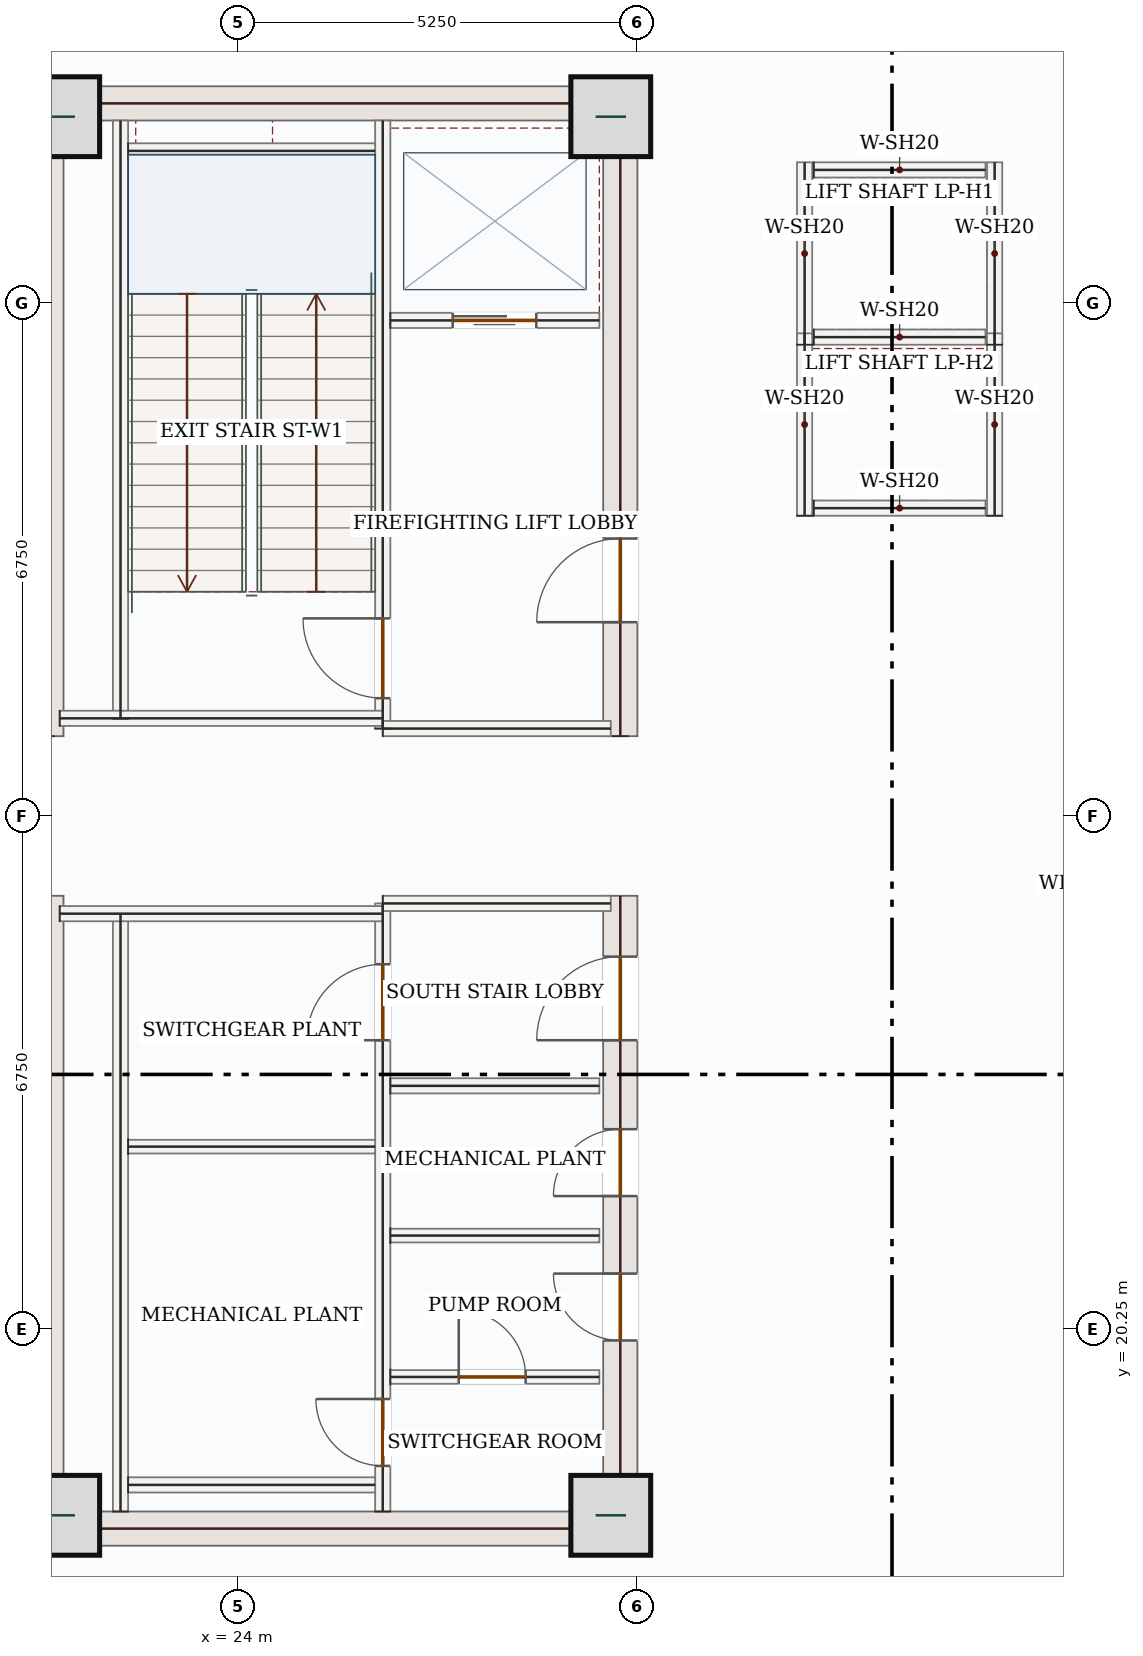
"""IFC4 building model, lengths in metres.
Left out: names, types, materials, properties, quantities, classifications, styles, units other than length and angle.
Written with IfcOpenShell. Run it as: python <this file> out.ifc"""

import sys

from ifc_helpers import new_model, si_unit, direction, frame, frame_2d, origin, origin_2d, place, context, subcontext, project, spatial, rectangle, extrude, source, transform, mapped, element, fill, save


model = new_model("IFC4")
c1 = context("Model", 3, precision=1e-05, world=origin(), true_north=direction((0.0, 1.0)))
c2 = subcontext(c1, "Body", "Model", "MODEL_VIEW")
j1 = project(units=[si_unit("LENGTHUNIT", "METRE"), si_unit("PLANEANGLEUNIT", "RADIAN")], contexts=[c1])
p1 = place(None, origin())
s1 = spatial("IfcSite", under=j1, at=p1, CompositionType="ELEMENT")
p2 = place(p1, origin())
s2 = spatial("IfcBuilding", under=s1, at=p2, CompositionType="ELEMENT")
p3 = place(p2, frame((0.0, 0.0, 314.1)))
s3 = spatial("IfcBuildingStorey", under=s2, at=p3, CompositionType="ELEMENT", Elevation=314.1)
m1 = source(origin(), c2, "Body", "SweptSolid", [
    extrude(rectangle(XDim=8.55, YDim=0.45, at=frame_2d((4.275, 0.0))), origin(), (0.0, 0.0, 1.0), 5.45),
])
for number, where, z_axis, x_axis in (
    (1, (21.475, 17.4, 0.0), (0.0, 0.0, 1.0), (0.0, 1.0, 0.0)),
    (2, (21.475, 28.05, 0.0), (0.0, 0.0, 1.0), (0.0, 1.0, 0.0)),
):
    element("IfcWall", number, at=place(p3, frame(where, z_axis=z_axis, x_axis=x_axis)), inside=s3, PredefinedType="SHEAR", context=c2, shape_type="MappedRepresentation", body=[
        mapped(m1, transform((0.0, 0.0, 0.0), x_axis=(1.0, 0.0, 0.0), y_axis=(0.0, 1.0, 0.0), z_axis=(0.0, 0.0, 1.0), scale=1.0)),
    ])
p4 = place(p3, frame((29.025, 17.4, 0.0), z_axis=(0.0, 0.0, 1.0), x_axis=(0.0, 1.0, 0.0)))
e3 = element("IfcWall", 3, at=p4, inside=s3, PredefinedType="SHEAR", context=c2, shape_type="SweptSolid", body=[
    extrude(rectangle(XDim=8.55, YDim=0.45, at=frame_2d((4.275, 0.0))), origin(), (0.0, 0.0, 1.0), 5.45),
])
p5 = place(p4, frame((6.65, 0.0, 0.0)))
e4 = element("IfcOpeningElement", 4, at=p5, cuts=e3, PredefinedType="OPENING", context=c2, shape_type="SweptSolid", body=[
    extrude(rectangle(XDim=1.1, YDim=2.2, at=frame_2d((0.55, 1.1))), frame((0.0, 0.235, 0.0), z_axis=(0.0, -1.0, 0.0), x_axis=(1.0, 0.0, 0.0)), (0.0, 0.0, 1.0), 0.47),
])
p6 = place(p4, frame((2.7, 0.0, 0.0)))
e5 = element("IfcOpeningElement", 5, at=p6, cuts=e3, PredefinedType="OPENING", context=c2, shape_type="SweptSolid", body=[
    extrude(rectangle(XDim=0.88, YDim=2.1, at=frame_2d((0.44, 1.05))), frame((0.0, 0.235, 0.0), z_axis=(0.0, -1.0, 0.0), x_axis=(1.0, 0.0, 0.0)), (0.0, 0.0, 1.0), 0.47),
])
p7 = place(p4, frame((4.6, 0.0, 0.0)))
e6 = element("IfcOpeningElement", 6, at=p7, cuts=e3, PredefinedType="OPENING", context=c2, shape_type="SweptSolid", body=[
    extrude(rectangle(XDim=0.88, YDim=2.1, at=frame_2d((0.44, 1.05))), frame((0.0, 0.235, 0.0), z_axis=(0.0, -1.0, 0.0), x_axis=(1.0, 0.0, 0.0)), (0.0, 0.0, 1.0), 0.47),
])
p8 = place(p3, frame((29.025, 28.05, 0.0), z_axis=(0.0, 0.0, 1.0), x_axis=(0.0, 1.0, 0.0)))
e7 = element("IfcWall", 7, at=p8, inside=s3, PredefinedType="SHEAR", context=c2, shape_type="SweptSolid", body=[
    extrude(rectangle(XDim=8.55, YDim=0.45, at=frame_2d((4.275, 0.0))), origin(), (0.0, 0.0, 1.0), 5.45),
])
p9 = place(p8, frame((1.5, 0.0, 0.0)))
e8 = element("IfcOpeningElement", 8, at=p9, cuts=e7, PredefinedType="OPENING", context=c2, shape_type="SweptSolid", body=[
    extrude(rectangle(XDim=1.1, YDim=2.2, at=frame_2d((0.55, 1.1))), frame((0.0, 0.235, 0.0), z_axis=(0.0, -1.0, 0.0), x_axis=(1.0, 0.0, 0.0)), (0.0, 0.0, 1.0), 0.47),
])
m2 = source(origin(), c2, "Body", "SweptSolid", [
    extrude(rectangle(XDim=7.1, YDim=0.45, at=frame_2d((3.55, 0.0))), origin(), (0.0, 0.0, 1.0), 5.45),
])
for number, where, z_axis, x_axis in (
    (9, (21.7, 17.625, 0.0), (0.0, 0.0, 1.0), (1.0, 0.0, 0.0)),
    (10, (21.7, 36.375, 0.0), (0.0, 0.0, 1.0), (1.0, 0.0, 0.0)),
):
    element("IfcWall", number, at=place(p3, frame(where, z_axis=z_axis, x_axis=x_axis)), inside=s3, PredefinedType="SHEAR", context=c2, shape_type="MappedRepresentation", body=[
        mapped(m2, transform((0.0, 0.0, 0.0), x_axis=(1.0, 0.0, 0.0), y_axis=(0.0, 1.0, 0.0), z_axis=(0.0, 0.0, 1.0), scale=1.0)),
    ])
m3 = source(origin(), c2, "Body", "SweptSolid", [
    extrude(rectangle(XDim=1.05, YDim=1.05, at=origin_2d()), origin(), (0.0, 0.0, 1.0), 5.7),
])
for number, where, z_axis, x_axis in (
    (11, (21.65, 17.8, 0.0), (0.0, 0.0, 1.0), (1.0, 0.0, 0.0)),
    (12, (28.9, 17.8, 0.0), (0.0, 0.0, 1.0), (1.0, 0.0, 0.0)),
    (13, (21.65, 36.2, 0.0), (0.0, 0.0, 1.0), (1.0, 0.0, 0.0)),
    (14, (28.9, 36.2, 0.0), (0.0, 0.0, 1.0), (1.0, 0.0, 0.0)),
):
    element("IfcColumn", number, at=place(p3, frame(where, z_axis=z_axis, x_axis=x_axis)), inside=s3, PredefinedType="COLUMN", context=c2, shape_type="MappedRepresentation", body=[
        mapped(m3, transform((0.0, 0.0, 0.0), x_axis=(1.0, 0.0, 0.0), y_axis=(0.0, 1.0, 0.0), z_axis=(0.0, 0.0, 1.0), scale=1.0)),
    ])
m4 = source(origin(), c2, "Body", "SweptSolid", [
    extrude(rectangle(XDim=7.87, YDim=0.2, at=frame_2d((3.935, 0.0))), origin(), (0.0, 0.0, 1.0), 5.45),
])
for number, where, z_axis, x_axis in (
    (15, (22.45, 17.85, 0.0), (0.0, 0.0, 1.0), (0.0, 1.0, 0.0)),
    (16, (22.45, 28.28, 0.0), (0.0, 0.0, 1.0), (0.0, 1.0, 0.0)),
):
    element("IfcWall", number, at=place(p3, frame(where, z_axis=z_axis, x_axis=x_axis)), inside=s3, PredefinedType="SOLIDWALL", context=c2, shape_type="MappedRepresentation", body=[
        mapped(m4, transform((0.0, 0.0, 0.0), x_axis=(1.0, 0.0, 0.0), y_axis=(0.0, 1.0, 0.0), z_axis=(0.0, 0.0, 1.0), scale=1.0)),
    ])
p10 = place(p3, frame((25.9, 17.85, 0.0), z_axis=(0.0, 0.0, 1.0), x_axis=(0.0, 1.0, 0.0)))
e17 = element("IfcWall", 17, at=p10, inside=s3, PredefinedType="SOLIDWALL", context=c2, shape_type="SweptSolid", body=[
    extrude(rectangle(XDim=8.0, YDim=0.2, at=frame_2d((4.0, 0.0))), origin(), (0.0, 0.0, 1.0), 5.45),
])
p11 = place(p10, frame((6.2, 0.0, 0.0)))
e18 = element("IfcOpeningElement", 18, at=p11, cuts=e17, PredefinedType="OPENING", context=c2, shape_type="SweptSolid", body=[
    extrude(rectangle(XDim=1.0, YDim=2.15, at=frame_2d((0.5, 1.075))), frame((0.0, 0.11, 0.0), z_axis=(0.0, -1.0, 0.0), x_axis=(1.0, 0.0, 0.0)), (0.0, 0.0, 1.0), 0.22),
])
p12 = place(p10, frame((0.6, 0.0, 0.0)))
e19 = element("IfcOpeningElement", 19, at=p12, cuts=e17, PredefinedType="OPENING", context=c2, shape_type="SweptSolid", body=[
    extrude(rectangle(XDim=0.88, YDim=2.1, at=frame_2d((0.44, 1.05))), frame((0.0, 0.11, 0.0), z_axis=(0.0, -1.0, 0.0), x_axis=(1.0, 0.0, 0.0)), (0.0, 0.0, 1.0), 0.22),
])
p13 = place(p3, frame((25.9, 28.15, 0.0), z_axis=(0.0, 0.0, 1.0), x_axis=(0.0, 1.0, 0.0)))
e20 = element("IfcWall", 20, at=p13, inside=s3, PredefinedType="SOLIDWALL", context=c2, shape_type="SweptSolid", body=[
    extrude(rectangle(XDim=8.0, YDim=0.2, at=frame_2d((4.0, 0.0))), origin(), (0.0, 0.0, 1.0), 5.45),
])
p14 = place(p13, frame((0.4, 0.0, 0.0)))
e21 = element("IfcOpeningElement", 21, at=p14, cuts=e20, PredefinedType="OPENING", context=c2, shape_type="SweptSolid", body=[
    extrude(rectangle(XDim=1.05, YDim=2.15, at=frame_2d((0.525, 1.075))), frame((0.0, 0.11, 0.0), z_axis=(0.0, -1.0, 0.0), x_axis=(1.0, 0.0, 0.0)), (0.0, 0.0, 1.0), 0.22),
])
m5 = source(origin(), c2, "Body", "SweptSolid", [
    extrude(rectangle(XDim=4.25, YDim=0.2, at=frame_2d((2.125, 0.0))), origin(), (0.0, 0.0, 1.0), 5.45),
])
p15 = place(p3, frame((21.65, 25.715, 0.0), z_axis=(0.0, 0.0, 1.0), x_axis=(1.0, 0.0, 0.0)))
e22 = element("IfcWall", 22, at=p15, inside=s3, PredefinedType="SOLIDWALL", context=c2, shape_type="MappedRepresentation", body=[
    mapped(m5, transform((0.0, 0.0, 0.0), x_axis=(1.0, 0.0, 0.0), y_axis=(0.0, 1.0, 0.0), z_axis=(0.0, 0.0, 1.0), scale=1.0)),
])
m6 = source(origin(), c2, "Body", "SweptSolid", [
    extrude(rectangle(XDim=3.0, YDim=0.2, at=frame_2d((1.5, 0.0))), origin(), (0.0, 0.0, 1.0), 5.45),
])
p16 = place(p3, frame((25.9, 25.85, 0.0), z_axis=(0.0, 0.0, 1.0), x_axis=(1.0, 0.0, 0.0)))
e23 = element("IfcWall", 23, at=p16, inside=s3, PredefinedType="SOLIDWALL", context=c2, shape_type="MappedRepresentation", body=[
    mapped(m6, transform((0.0, 0.0, 0.0), x_axis=(1.0, 0.0, 0.0), y_axis=(0.0, 1.0, 0.0), z_axis=(0.0, 0.0, 1.0), scale=1.0)),
])
p17 = place(p3, frame((21.65, 28.285, 0.0), z_axis=(0.0, 0.0, 1.0), x_axis=(1.0, 0.0, 0.0)))
e24 = element("IfcWall", 24, at=p17, inside=s3, PredefinedType="SOLIDWALL", context=c2, shape_type="MappedRepresentation", body=[
    mapped(m5, transform((0.0, 0.0, 0.0), x_axis=(1.0, 0.0, 0.0), y_axis=(0.0, 1.0, 0.0), z_axis=(0.0, 0.0, 1.0), scale=1.0)),
])
p18 = place(p3, frame((25.9, 28.15, 0.0), z_axis=(0.0, 0.0, 1.0), x_axis=(1.0, 0.0, 0.0)))
e25 = element("IfcWall", 25, at=p18, inside=s3, PredefinedType="SOLIDWALL", context=c2, shape_type="MappedRepresentation", body=[
    mapped(m6, transform((0.0, 0.0, 0.0), x_axis=(1.0, 0.0, 0.0), y_axis=(0.0, 1.0, 0.0), z_axis=(0.0, 0.0, 1.0), scale=1.0)),
])
m7 = source(origin(), c2, "Body", "SweptSolid", [
    extrude(rectangle(XDim=3.25, YDim=0.2, at=frame_2d((1.625, 0.0))), origin(), (0.0, 0.0, 1.0), 5.45),
])
for number, where, z_axis, x_axis in (
    (26, (22.55, 35.75, 0.0), (0.0, 0.0, 1.0), (1.0, 0.0, 0.0)),
    (27, (22.55, 18.2, 0.0), (0.0, 0.0, 1.0), (1.0, 0.0, 0.0)),
):
    element("IfcWall", number, at=place(p3, frame(where, z_axis=z_axis, x_axis=x_axis)), inside=s3, PredefinedType="SOLIDWALL", context=c2, shape_type="MappedRepresentation", body=[
        mapped(m7, transform((0.0, 0.0, 0.0), x_axis=(1.0, 0.0, 0.0), y_axis=(0.0, 1.0, 0.0), z_axis=(0.0, 0.0, 1.0), scale=1.0)),
    ])
m8 = source(origin(), c2, "Body", "SweptSolid", [
    extrude(rectangle(XDim=3.25, YDim=0.18, at=frame_2d((1.625, 0.0))), origin(), (0.0, 0.0, 1.0), 5.45),
])
p19 = place(p3, frame((22.55, 22.65, 0.0), z_axis=(0.0, 0.0, 1.0), x_axis=(1.0, 0.0, 0.0)))
e28 = element("IfcWall", 28, at=p19, inside=s3, PredefinedType="PARTITIONING", context=c2, shape_type="MappedRepresentation", body=[
    mapped(m8, transform((0.0, 0.0, 0.0), x_axis=(1.0, 0.0, 0.0), y_axis=(0.0, 1.0, 0.0), z_axis=(0.0, 0.0, 1.0), scale=1.0)),
])
p20 = place(p3, frame((26.0, 33.52, 0.0), z_axis=(0.0, 0.0, 1.0), x_axis=(1.0, 0.0, 0.0)))
e29 = element("IfcWall", 29, at=p20, inside=s3, PredefinedType="SOLIDWALL", context=c2, shape_type="SweptSolid", body=[
    extrude(rectangle(XDim=2.75, YDim=0.2, at=frame_2d((1.375, 0.0))), origin(), (0.0, 0.0, 1.0), 5.45),
])
p21 = place(p20, frame((0.82, 0.0, 0.0)))
e30 = element("IfcOpeningElement", 30, at=p21, cuts=e29, PredefinedType="OPENING", context=c2, shape_type="SweptSolid", body=[
    extrude(rectangle(XDim=1.1, YDim=2.15, at=frame_2d((0.55, 1.075))), frame((0.0, 0.11, 0.0), z_axis=(0.0, -1.0, 0.0), x_axis=(1.0, 0.0, 0.0)), (0.0, 0.0, 1.0), 0.22),
])
m9 = source(origin(), c2, "Body", "SweptSolid", [
    extrude(rectangle(XDim=2.75, YDim=0.2, at=frame_2d((1.375, 0.0))), origin(), (0.0, 0.0, 1.0), 5.45),
])
p22 = place(p3, frame((26.0, 23.45, 0.0), z_axis=(0.0, 0.0, 1.0), x_axis=(1.0, 0.0, 0.0)))
e31 = element("IfcWall", 31, at=p22, inside=s3, PredefinedType="SOLIDWALL", context=c2, shape_type="MappedRepresentation", body=[
    mapped(m9, transform((0.0, 0.0, 0.0), x_axis=(1.0, 0.0, 0.0), y_axis=(0.0, 1.0, 0.0), z_axis=(0.0, 0.0, 1.0), scale=1.0)),
])
p23 = place(p3, frame((26.0, 19.62, 0.0), z_axis=(0.0, 0.0, 1.0), x_axis=(1.0, 0.0, 0.0)))
e32 = element("IfcWall", 32, at=p23, inside=s3, PredefinedType="PARTITIONING", context=c2, shape_type="SweptSolid", body=[
    extrude(rectangle(XDim=2.75, YDim=0.18, at=frame_2d((1.375, 0.0))), origin(), (0.0, 0.0, 1.0), 5.45),
])
p24 = place(p23, frame((0.9, 0.0, 0.0)))
e33 = element("IfcOpeningElement", 33, at=p24, cuts=e32, PredefinedType="OPENING", context=c2, shape_type="SweptSolid", body=[
    extrude(rectangle(XDim=0.88, YDim=2.1, at=frame_2d((0.44, 1.05))), frame((0.0, 0.1, 0.0), z_axis=(0.0, -1.0, 0.0), x_axis=(1.0, 0.0, 0.0)), (0.0, 0.0, 1.0), 0.2),
])
m10 = source(origin(), c2, "Body", "SweptSolid", [
    extrude(rectangle(XDim=2.75, YDim=0.18, at=frame_2d((1.375, 0.0))), origin(), (0.0, 0.0, 1.0), 5.45),
])
p25 = place(p3, frame((26.0, 21.48, 0.0), z_axis=(0.0, 0.0, 1.0), x_axis=(1.0, 0.0, 0.0)))
e34 = element("IfcWall", 34, at=p25, inside=s3, PredefinedType="PARTITIONING", context=c2, shape_type="MappedRepresentation", body=[
    mapped(m10, transform((0.0, 0.0, 0.0), x_axis=(1.0, 0.0, 0.0), y_axis=(0.0, 1.0, 0.0), z_axis=(0.0, 0.0, 1.0), scale=1.0)),
])
m11 = source(origin(), c2, "Body", "SweptSolid", [
    extrude(rectangle(XDim=2.4, YDim=0.2, at=frame_2d((1.2, 0.0))), origin(), (0.0, 0.0, 1.0), 5.45),
])
for number, where, z_axis, x_axis in (
    (35, (31.45, 33.2, 0.0), (0.0, 0.0, 1.0), (0.0, 1.0, 0.0)),
    (36, (33.95, 33.2, 0.0), (0.0, 0.0, 1.0), (0.0, 1.0, 0.0)),
):
    element("IfcWall", number, at=place(p3, frame(where, z_axis=z_axis, x_axis=x_axis)), inside=s3, PredefinedType="SOLIDWALL", context=c2, shape_type="MappedRepresentation", body=[
        mapped(m11, transform((0.0, 0.0, 0.0), x_axis=(1.0, 0.0, 0.0), y_axis=(0.0, 1.0, 0.0), z_axis=(0.0, 0.0, 1.0), scale=1.0)),
    ])
m12 = source(origin(), c2, "Body", "SweptSolid", [
    extrude(rectangle(XDim=2.26, YDim=0.2, at=frame_2d((1.13, 0.0))), origin(), (0.0, 0.0, 1.0), 5.45),
])
for number, where, z_axis, x_axis in (
    (37, (31.57, 33.3, 0.0), (0.0, 0.0, 1.0), (1.0, 0.0, 0.0)),
    (38, (31.57, 35.5, 0.0), (0.0, 0.0, 1.0), (1.0, 0.0, 0.0)),
):
    element("IfcWall", number, at=place(p3, frame(where, z_axis=z_axis, x_axis=x_axis)), inside=s3, PredefinedType="SOLIDWALL", context=c2, shape_type="MappedRepresentation", body=[
        mapped(m12, transform((0.0, 0.0, 0.0), x_axis=(1.0, 0.0, 0.0), y_axis=(0.0, 1.0, 0.0), z_axis=(0.0, 0.0, 1.0), scale=1.0)),
    ])
for number, where, z_axis, x_axis in (
    (39, (31.45, 30.95, 0.0), (0.0, 0.0, 1.0), (0.0, 1.0, 0.0)),
    (40, (33.95, 30.95, 0.0), (0.0, 0.0, 1.0), (0.0, 1.0, 0.0)),
):
    element("IfcWall", number, at=place(p3, frame(where, z_axis=z_axis, x_axis=x_axis)), inside=s3, PredefinedType="SOLIDWALL", context=c2, shape_type="MappedRepresentation", body=[
        mapped(m11, transform((0.0, 0.0, 0.0), x_axis=(1.0, 0.0, 0.0), y_axis=(0.0, 1.0, 0.0), z_axis=(0.0, 0.0, 1.0), scale=1.0)),
    ])
p26 = place(p3, frame((31.57, 31.05, 0.0), z_axis=(0.0, 0.0, 1.0), x_axis=(1.0, 0.0, 0.0)))
e41 = element("IfcWall", 41, at=p26, inside=s3, PredefinedType="SOLIDWALL", context=c2, shape_type="MappedRepresentation", body=[
    mapped(m12, transform((0.0, 0.0, 0.0), x_axis=(1.0, 0.0, 0.0), y_axis=(0.0, 1.0, 0.0), z_axis=(0.0, 0.0, 1.0), scale=1.0)),
])
m13 = source(origin(), c2, "Body", "SweptSolid", [
    extrude(rectangle(XDim=1.05, YDim=2.15, at=frame_2d((0.525, 1.075))), frame((0.0, 0.025, 0.0), z_axis=(0.0, -1.0, 0.0), x_axis=(1.0, 0.0, 0.0)), (0.0, 0.0, 1.0), 0.05),
])
p27 = place(p14, origin())
e42 = element("IfcDoor", 42, at=p27, inside=s3, OperationType="SINGLE_SWING_RIGHT", PredefinedType="DOOR", context=c2, shape_type="MappedRepresentation", body=[
    mapped(m13, transform((0.0, 0.0, 0.0), x_axis=(1.0, 0.0, 0.0), y_axis=(0.0, 1.0, 0.0), z_axis=(0.0, 0.0, 1.0), scale=1.0)),
])
fill(e21, e42)
m14 = source(origin(), c2, "Body", "SweptSolid", [
    extrude(rectangle(XDim=1.0, YDim=2.15, at=frame_2d((0.5, 1.075))), frame((0.0, 0.025, 0.0), z_axis=(0.0, -1.0, 0.0), x_axis=(1.0, 0.0, 0.0)), (0.0, 0.0, 1.0), 0.05),
])
p28 = place(p11, origin())
e43 = element("IfcDoor", 43, at=p28, inside=s3, OperationType="SINGLE_SWING_LEFT", PredefinedType="DOOR", context=c2, shape_type="MappedRepresentation", body=[
    mapped(m14, transform((0.0, 0.0, 0.0), x_axis=(1.0, 0.0, 0.0), y_axis=(0.0, 1.0, 0.0), z_axis=(0.0, 0.0, 1.0), scale=1.0)),
])
fill(e18, e43)
m15 = source(origin(), c2, "Body", "SweptSolid", [
    extrude(rectangle(XDim=0.88, YDim=2.1, at=frame_2d((0.44, 1.05))), frame((0.0, 0.025, 0.0), z_axis=(0.0, -1.0, 0.0), x_axis=(1.0, 0.0, 0.0)), (0.0, 0.0, 1.0), 0.05),
])
p29 = place(p12, origin())
e44 = element("IfcDoor", 44, at=p29, inside=s3, OperationType="SINGLE_SWING_RIGHT", PredefinedType="DOOR", context=c2, shape_type="MappedRepresentation", body=[
    mapped(m15, transform((0.0, 0.0, 0.0), x_axis=(1.0, 0.0, 0.0), y_axis=(0.0, 1.0, 0.0), z_axis=(0.0, 0.0, 1.0), scale=1.0)),
])
fill(e19, e44)
m16 = source(origin(), c2, "Body", "SweptSolid", [
    extrude(rectangle(XDim=1.1, YDim=2.15, at=frame_2d((0.55, 1.075))), frame((0.0, 0.025, 0.0), z_axis=(0.0, -1.0, 0.0), x_axis=(1.0, 0.0, 0.0)), (0.0, 0.0, 1.0), 0.05),
])
p30 = place(p21, origin())
e45 = element("IfcDoor", 45, at=p30, inside=s3, OperationType="DOUBLE_DOOR_SLIDING", PredefinedType="DOOR", context=c2, shape_type="MappedRepresentation", body=[
    mapped(m16, transform((0.0, 0.0, 0.0), x_axis=(1.0, 0.0, 0.0), y_axis=(0.0, 1.0, 0.0), z_axis=(0.0, 0.0, 1.0), scale=1.0)),
])
fill(e30, e45)
m17 = source(origin(), c2, "Body", "SweptSolid", [
    extrude(rectangle(XDim=1.1, YDim=2.2, at=frame_2d((0.55, 1.1))), frame((0.0, 0.025, 0.0), z_axis=(0.0, -1.0, 0.0), x_axis=(1.0, 0.0, 0.0)), (0.0, 0.0, 1.0), 0.05),
])
p31 = place(p9, origin())
e46 = element("IfcDoor", 46, at=p31, inside=s3, OperationType="SINGLE_SWING_LEFT", PredefinedType="DOOR", context=c2, shape_type="MappedRepresentation", body=[
    mapped(m17, transform((0.0, 0.0, 0.0), x_axis=(1.0, 0.0, 0.0), y_axis=(0.0, 1.0, 0.0), z_axis=(0.0, 0.0, 1.0), scale=1.0)),
])
fill(e8, e46)
p32 = place(p5, origin())
e47 = element("IfcDoor", 47, at=p32, inside=s3, OperationType="SINGLE_SWING_LEFT", PredefinedType="DOOR", context=c2, shape_type="MappedRepresentation", body=[
    mapped(m17, transform((0.0, 0.0, 0.0), x_axis=(1.0, 0.0, 0.0), y_axis=(0.0, 1.0, 0.0), z_axis=(0.0, 0.0, 1.0), scale=1.0)),
])
fill(e4, e47)
p33 = place(p24, origin())
e48 = element("IfcDoor", 48, at=p33, inside=s3, OperationType="SINGLE_SWING_LEFT", PredefinedType="DOOR", context=c2, shape_type="MappedRepresentation", body=[
    mapped(m15, transform((0.0, 0.0, 0.0), x_axis=(1.0, 0.0, 0.0), y_axis=(0.0, 1.0, 0.0), z_axis=(0.0, 0.0, 1.0), scale=1.0)),
])
fill(e33, e48)
p34 = place(p6, origin())
e49 = element("IfcDoor", 49, at=p34, inside=s3, OperationType="SINGLE_SWING_RIGHT", PredefinedType="DOOR", context=c2, shape_type="MappedRepresentation", body=[
    mapped(m15, transform((0.0, 0.0, 0.0), x_axis=(1.0, 0.0, 0.0), y_axis=(0.0, 1.0, 0.0), z_axis=(0.0, 0.0, 1.0), scale=1.0)),
])
fill(e5, e49)
p35 = place(p7, origin())
e50 = element("IfcDoor", 50, at=p35, inside=s3, OperationType="SINGLE_SWING_LEFT", PredefinedType="DOOR", context=c2, shape_type="MappedRepresentation", body=[
    mapped(m15, transform((0.0, 0.0, 0.0), x_axis=(1.0, 0.0, 0.0), y_axis=(0.0, 1.0, 0.0), z_axis=(0.0, 0.0, 1.0), scale=1.0)),
])
fill(e6, e50)
save(model, sys.argv[1])
